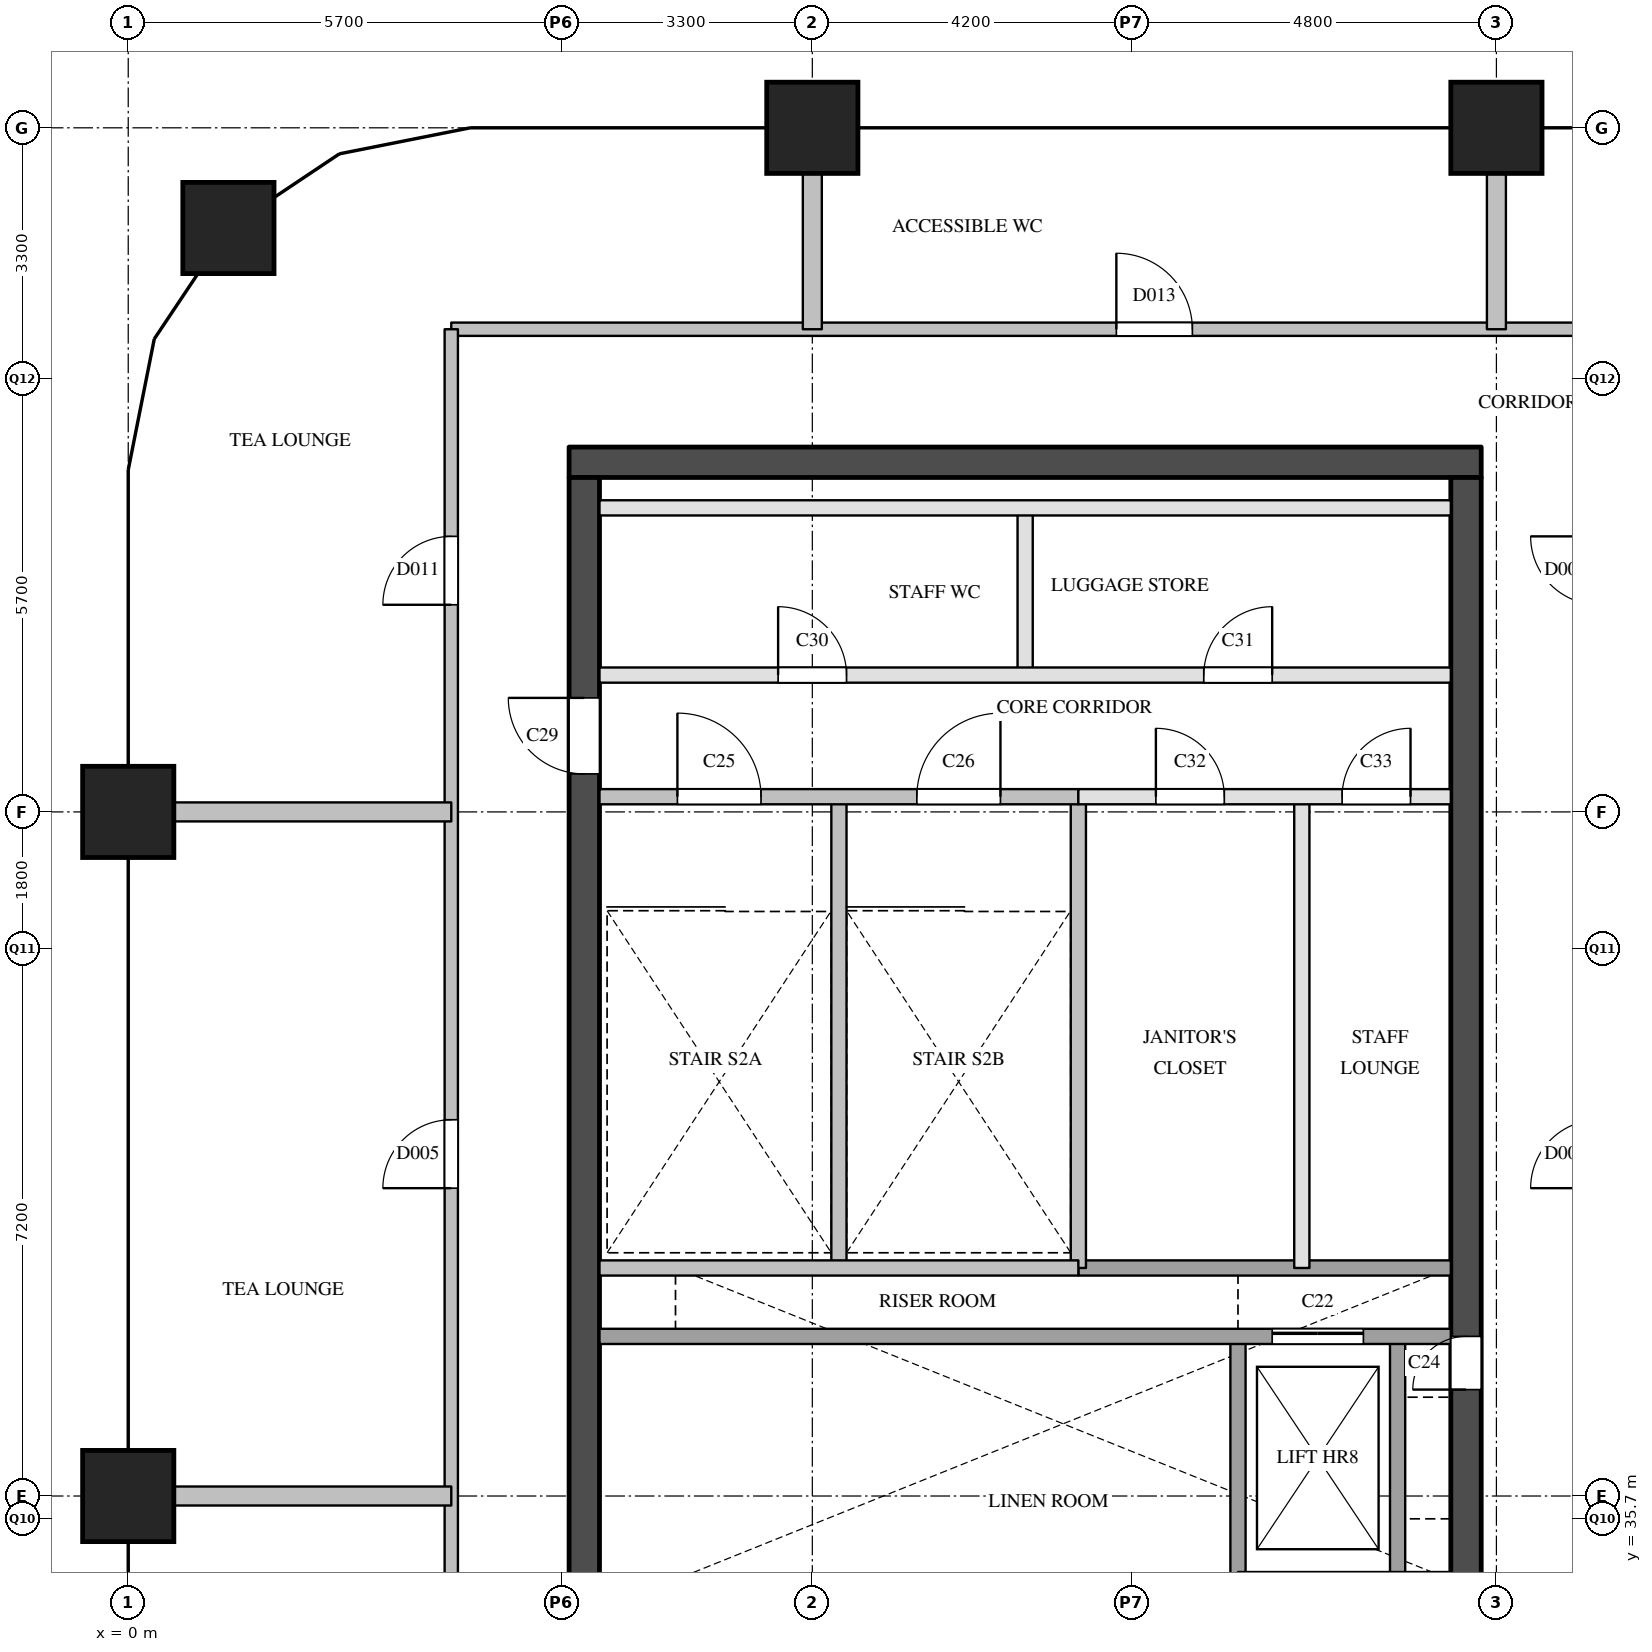
"""IFC4 building model, lengths in metres.
Left out: names, types, materials, properties, quantities, classifications, styles, units other than length and angle.
Written with IfcOpenShell. Run it as: python <this file> out.ifc"""

import sys

from ifc_helpers import new_model, si_unit, direction, frame, frame_2d, origin, origin_2d, place, context, subcontext, project, spatial, rectangle, extrude, element, fill, save


model = new_model("IFC4")
c1 = context("Model", 3, precision=1e-05, world=origin(), true_north=direction((0.0, 1.0)))
c2 = subcontext(c1, "Body", "Model", "MODEL_VIEW")
j1 = project(units=[si_unit("LENGTHUNIT", "METRE"), si_unit("PLANEANGLEUNIT", "RADIAN")], contexts=[c1])
p1 = place(None, origin())
s1 = spatial("IfcSite", under=j1, at=p1, CompositionType="ELEMENT")
p2 = place(p1, origin())
s2 = spatial("IfcBuilding", under=s1, at=p2, CompositionType="ELEMENT")
p3 = place(p2, frame((0.0, 0.0, 230.6)))
s3 = spatial("IfcBuildingStorey", under=s2, at=p3, CompositionType="ELEMENT", Elevation=230.6)
for number, where, z_axis, x_axis in (
    (1, (0.0, 36.0, 0.0), (0.0, 0.0, 1.0), (1.0, 0.0, 0.0)),
    (2, (0.0, 45.0, 0.0), (0.0, 0.0, 1.0), (1.0, 0.0, 0.0)),
    (3, (1.318, 52.682, 0.0), (0.0, 0.0, 1.0), (1.0, 0.0, 0.0)),
    (4, (9.0, 54.0, 0.0), (0.0, 0.0, 1.0), (1.0, 0.0, 0.0)),
    (5, (18.0, 54.0, 0.0), (0.0, 0.0, 1.0), (1.0, 0.0, 0.0)),
):
    element("IfcColumn", number, at=place(p3, frame(where, z_axis=z_axis, x_axis=x_axis)), inside=s3, PredefinedType="COLUMN", context=c2, shape_type="SweptSolid", body=[
        extrude(rectangle(XDim=1.2, YDim=1.2, at=origin_2d()), origin(), (0.0, 0.0, 1.0), 3.9),
    ])
p4 = place(p3, frame((5.8, 49.6, 0.0), z_axis=(0.0, 0.0, 1.0), x_axis=(1.0, 0.0, 0.0)))
e6 = element("IfcWall", 6, at=p4, inside=s3, PredefinedType="SHEAR", context=c2, shape_type="SweptSolid", body=[
    extrude(rectangle(XDim=12.0, YDim=0.4, at=frame_2d((6.0, 0.0))), origin(), (0.0, 0.0, 1.0), 3.6),
])
p5 = place(p3, frame((6.0, 29.1, 0.0), z_axis=(0.0, 0.0, 1.0), x_axis=(0.0, 1.0, 0.0)))
e7 = element("IfcWall", 7, at=p5, inside=s3, PredefinedType="SHEAR", context=c2, shape_type="SweptSolid", body=[
    extrude(rectangle(XDim=20.3, YDim=0.4, at=frame_2d((10.15, 0.0))), origin(), (0.0, 0.0, 1.0), 3.6),
])
p6 = place(p5, frame((3.45, 0.0, 0.0)))
e8 = element("IfcOpeningElement", 8, at=p6, cuts=e7, PredefinedType="OPENING", context=c2, shape_type="SweptSolid", body=[
    extrude(rectangle(XDim=1.0, YDim=2.1, at=frame_2d((0.5, 1.05))), frame((0.0, 0.21, 0.0), z_axis=(0.0, -1.0, 0.0), x_axis=(1.0, 0.0, 0.0)), (0.0, 0.0, 1.0), 0.42),
])
p7 = place(p5, frame((16.4, 0.0, 0.0)))
e9 = element("IfcOpeningElement", 9, at=p7, cuts=e7, PredefinedType="OPENING", context=c2, shape_type="SweptSolid", body=[
    extrude(rectangle(XDim=1.0, YDim=2.1, at=frame_2d((0.5, 1.05))), frame((0.0, 0.21, 0.0), z_axis=(0.0, -1.0, 0.0), x_axis=(1.0, 0.0, 0.0)), (0.0, 0.0, 1.0), 0.42),
])
p8 = place(p3, frame((17.6, 29.1, 0.0), z_axis=(0.0, 0.0, 1.0), x_axis=(0.0, 1.0, 0.0)))
e10 = element("IfcWall", 10, at=p8, inside=s3, PredefinedType="SHEAR", context=c2, shape_type="SweptSolid", body=[
    extrude(rectangle(XDim=20.3, YDim=0.4, at=frame_2d((10.15, 0.0))), origin(), (0.0, 0.0, 1.0), 3.6),
])
p9 = place(p8, frame((1.25, 0.0, 0.0)))
e11 = element("IfcOpeningElement", 11, at=p9, cuts=e10, PredefinedType="OPENING", context=c2, shape_type="SweptSolid", body=[
    extrude(rectangle(XDim=0.7, YDim=2.1, at=frame_2d((0.35, 1.05))), frame((0.0, 0.21, 0.0), z_axis=(0.0, -1.0, 0.0), x_axis=(1.0, 0.0, 0.0)), (0.0, 0.0, 1.0), 0.42),
])
p10 = place(p8, frame((8.3, 0.0, 0.0)))
e12 = element("IfcOpeningElement", 12, at=p10, cuts=e10, PredefinedType="OPENING", context=c2, shape_type="SweptSolid", body=[
    extrude(rectangle(XDim=0.7, YDim=2.1, at=frame_2d((0.35, 1.05))), frame((0.0, 0.21, 0.0), z_axis=(0.0, -1.0, 0.0), x_axis=(1.0, 0.0, 0.0)), (0.0, 0.0, 1.0), 0.42),
])
p11 = place(p8, frame((3.6, 0.0, 0.0)))
e13 = element("IfcOpeningElement", 13, at=p11, cuts=e10, PredefinedType="OPENING", context=c2, shape_type="SweptSolid", body=[
    extrude(rectangle(XDim=1.8, YDim=2.1, at=frame_2d((0.9, 1.05))), frame((0.0, 0.21, 0.0), z_axis=(0.0, -1.0, 0.0), x_axis=(1.0, 0.0, 0.0)), (0.0, 0.0, 1.0), 0.42),
])
p12 = place(p3, frame((9.35, 39.0, 0.0), z_axis=(0.0, 0.0, 1.0), x_axis=(0.0, 1.0, 0.0)))
e14 = element("IfcWall", 14, at=p12, inside=s3, PredefinedType="SOLIDWALL", context=c2, shape_type="SweptSolid", body=[
    extrude(rectangle(XDim=6.2, YDim=0.2, at=frame_2d((3.1, 0.0))), origin(), (0.0, 0.0, 1.0), 3.6),
])
p13 = place(p3, frame((11.8, 46.8, 0.0), z_axis=(0.0, 0.0, 1.0), x_axis=(0.0, 1.0, 0.0)))
e15 = element("IfcWall", 15, at=p13, inside=s3, PredefinedType="PARTITIONING", context=c2, shape_type="SweptSolid", body=[
    extrude(rectangle(XDim=2.2, YDim=0.2, at=frame_2d((1.1, 0.0))), origin(), (0.0, 0.0, 1.0), 3.6),
])
p14 = place(p3, frame((12.5, 39.0, 0.0), z_axis=(0.0, 0.0, 1.0), x_axis=(0.0, 1.0, 0.0)))
e16 = element("IfcWall", 16, at=p14, inside=s3, PredefinedType="SOLIDWALL", context=c2, shape_type="SweptSolid", body=[
    extrude(rectangle(XDim=6.2, YDim=0.2, at=frame_2d((3.1, 0.0))), origin(), (0.0, 0.0, 1.0), 3.6),
])
p15 = place(p3, frame((14.6, 34.9, 0.0), z_axis=(0.0, 0.0, 1.0), x_axis=(0.0, 1.0, 0.0)))
e17 = element("IfcWall", 17, at=p15, inside=s3, PredefinedType="SOLIDWALL", context=c2, shape_type="SweptSolid", body=[
    extrude(rectangle(XDim=3.2, YDim=0.2, at=frame_2d((1.6, 0.0))), origin(), (0.0, 0.0, 1.0), 3.6),
])
p16 = place(p3, frame((15.44, 39.0, 0.0), z_axis=(0.0, 0.0, 1.0), x_axis=(0.0, 1.0, 0.0)))
e18 = element("IfcWall", 18, at=p16, inside=s3, PredefinedType="PARTITIONING", context=c2, shape_type="SweptSolid", body=[
    extrude(rectangle(XDim=6.2, YDim=0.2, at=frame_2d((3.1, 0.0))), origin(), (0.0, 0.0, 1.0), 3.6),
])
p17 = place(p3, frame((16.7, 34.9, 0.0), z_axis=(0.0, 0.0, 1.0), x_axis=(0.0, 1.0, 0.0)))
e19 = element("IfcWall", 19, at=p17, inside=s3, PredefinedType="SOLIDWALL", context=c2, shape_type="SweptSolid", body=[
    extrude(rectangle(XDim=3.2, YDim=0.2, at=frame_2d((1.6, 0.0))), origin(), (0.0, 0.0, 1.0), 3.6),
])
p18 = place(p3, frame((6.2, 38.1, 0.0), z_axis=(0.0, 0.0, 1.0), x_axis=(1.0, 0.0, 0.0)))
e20 = element("IfcWall", 20, at=p18, inside=s3, PredefinedType="SOLIDWALL", context=c2, shape_type="SweptSolid", body=[
    extrude(rectangle(XDim=11.2, YDim=0.2, at=frame_2d((5.6, 0.0))), origin(), (0.0, 0.0, 1.0), 3.6),
])
p19 = place(p18, frame((8.85, 0.0, 0.0)))
e21 = element("IfcOpeningElement", 21, at=p19, cuts=e20, PredefinedType="OPENING", context=c2, shape_type="SweptSolid", body=[
    extrude(rectangle(XDim=1.2, YDim=2.1, at=frame_2d((0.6, 1.05))), frame((0.0, 0.11, 0.0), z_axis=(0.0, -1.0, 0.0), x_axis=(1.0, 0.0, 0.0)), (0.0, 0.0, 1.0), 0.22),
])
p20 = place(p3, frame((12.5, 39.0, 0.0), z_axis=(0.0, 0.0, 1.0), x_axis=(1.0, 0.0, 0.0)))
e22 = element("IfcWall", 22, at=p20, inside=s3, PredefinedType="SOLIDWALL", context=c2, shape_type="SweptSolid", body=[
    extrude(rectangle(XDim=4.9, YDim=0.2, at=frame_2d((2.45, 0.0))), origin(), (0.0, 0.0, 1.0), 3.6),
])
p21 = place(p3, frame((6.2, 39.0, 0.0), z_axis=(0.0, 0.0, 1.0), x_axis=(1.0, 0.0, 0.0)))
e23 = element("IfcWall", 23, at=p21, inside=s3, PredefinedType="SOLIDWALL", context=c2, shape_type="SweptSolid", body=[
    extrude(rectangle(XDim=6.3, YDim=0.2, at=frame_2d((3.15, 0.0))), origin(), (0.0, 0.0, 1.0), 3.6),
])
p22 = place(p3, frame((12.5, 45.2, 0.0), z_axis=(0.0, 0.0, 1.0), x_axis=(1.0, 0.0, 0.0)))
e24 = element("IfcWall", 24, at=p22, inside=s3, PredefinedType="PARTITIONING", context=c2, shape_type="SweptSolid", body=[
    extrude(rectangle(XDim=4.9, YDim=0.2, at=frame_2d((2.45, 0.0))), origin(), (0.0, 0.0, 1.0), 3.6),
])
p23 = place(p22, frame((1.02, 0.0, 0.0)))
e25 = element("IfcOpeningElement", 25, at=p23, cuts=e24, PredefinedType="OPENING", context=c2, shape_type="SweptSolid", body=[
    extrude(rectangle(XDim=0.9, YDim=2.1, at=frame_2d((0.45, 1.05))), frame((0.0, 0.11, 0.0), z_axis=(0.0, -1.0, 0.0), x_axis=(1.0, 0.0, 0.0)), (0.0, 0.0, 1.0), 0.22),
])
p24 = place(p22, frame((3.47, 0.0, 0.0)))
e26 = element("IfcOpeningElement", 26, at=p24, cuts=e24, PredefinedType="OPENING", context=c2, shape_type="SweptSolid", body=[
    extrude(rectangle(XDim=0.9, YDim=2.1, at=frame_2d((0.45, 1.05))), frame((0.0, 0.11, 0.0), z_axis=(0.0, -1.0, 0.0), x_axis=(1.0, 0.0, 0.0)), (0.0, 0.0, 1.0), 0.22),
])
p25 = place(p3, frame((6.2, 45.2, 0.0), z_axis=(0.0, 0.0, 1.0), x_axis=(1.0, 0.0, 0.0)))
e27 = element("IfcWall", 27, at=p25, inside=s3, PredefinedType="SOLIDWALL", context=c2, shape_type="SweptSolid", body=[
    extrude(rectangle(XDim=6.3, YDim=0.2, at=frame_2d((3.15, 0.0))), origin(), (0.0, 0.0, 1.0), 3.6),
])
p26 = place(p25, frame((1.025, 0.0, 0.0)))
e28 = element("IfcOpeningElement", 28, at=p26, cuts=e27, PredefinedType="OPENING", context=c2, shape_type="SweptSolid", body=[
    extrude(rectangle(XDim=1.1, YDim=2.1, at=frame_2d((0.55, 1.05))), frame((0.0, 0.11, 0.0), z_axis=(0.0, -1.0, 0.0), x_axis=(1.0, 0.0, 0.0)), (0.0, 0.0, 1.0), 0.22),
])
p27 = place(p25, frame((4.175, 0.0, 0.0)))
e29 = element("IfcOpeningElement", 29, at=p27, cuts=e27, PredefinedType="OPENING", context=c2, shape_type="SweptSolid", body=[
    extrude(rectangle(XDim=1.1, YDim=2.1, at=frame_2d((0.55, 1.05))), frame((0.0, 0.11, 0.0), z_axis=(0.0, -1.0, 0.0), x_axis=(1.0, 0.0, 0.0)), (0.0, 0.0, 1.0), 0.22),
])
p28 = place(p3, frame((6.2, 46.8, 0.0), z_axis=(0.0, 0.0, 1.0), x_axis=(1.0, 0.0, 0.0)))
e30 = element("IfcWall", 30, at=p28, inside=s3, PredefinedType="PARTITIONING", context=c2, shape_type="SweptSolid", body=[
    extrude(rectangle(XDim=11.2, YDim=0.2, at=frame_2d((5.6, 0.0))), origin(), (0.0, 0.0, 1.0), 3.6),
])
p29 = place(p28, frame((2.35, 0.0, 0.0)))
e31 = element("IfcOpeningElement", 31, at=p29, cuts=e30, PredefinedType="OPENING", context=c2, shape_type="SweptSolid", body=[
    extrude(rectangle(XDim=0.9, YDim=2.1, at=frame_2d((0.45, 1.05))), frame((0.0, 0.11, 0.0), z_axis=(0.0, -1.0, 0.0), x_axis=(1.0, 0.0, 0.0)), (0.0, 0.0, 1.0), 0.22),
])
p30 = place(p28, frame((7.95, 0.0, 0.0)))
e32 = element("IfcOpeningElement", 32, at=p30, cuts=e30, PredefinedType="OPENING", context=c2, shape_type="SweptSolid", body=[
    extrude(rectangle(XDim=0.9, YDim=2.1, at=frame_2d((0.45, 1.05))), frame((0.0, 0.11, 0.0), z_axis=(0.0, -1.0, 0.0), x_axis=(1.0, 0.0, 0.0)), (0.0, 0.0, 1.0), 0.22),
])
p31 = place(p3, frame((6.2, 49.0, 0.0), z_axis=(0.0, 0.0, 1.0), x_axis=(1.0, 0.0, 0.0)))
e33 = element("IfcWall", 33, at=p31, inside=s3, PredefinedType="PARTITIONING", context=c2, shape_type="SweptSolid", body=[
    extrude(rectangle(XDim=11.2, YDim=0.2, at=frame_2d((5.6, 0.0))), origin(), (0.0, 0.0, 1.0), 3.6),
])
p32 = place(p3, frame((4.25, 51.35, 0.0), z_axis=(0.0, 0.0, 1.0), x_axis=(1.0, 0.0, 0.0)))
e34 = element("IfcWall", 34, at=p32, inside=s3, PredefinedType="PARTITIONING", context=c2, shape_type="SweptSolid", body=[
    extrude(rectangle(XDim=15.1, YDim=0.175, at=frame_2d((7.55, 0.0))), origin(), (0.0, 0.0, 1.0), 3.6),
])
p33 = place(p32, frame((8.75, 0.0, 0.0)))
e35 = element("IfcOpeningElement", 35, at=p33, cuts=e34, PredefinedType="OPENING", context=c2, shape_type="SweptSolid", body=[
    extrude(rectangle(XDim=1.0, YDim=2.1, at=frame_2d((0.5, 1.05))), frame((0.0, 0.097, 0.0), z_axis=(0.0, -1.0, 0.0), x_axis=(1.0, 0.0, 0.0)), (0.0, 0.0, 1.0), 0.195),
])
p34 = place(p3, frame((4.25, 28.5, 0.0), z_axis=(0.0, 0.0, 1.0), x_axis=(0.0, 1.0, 0.0)))
e36 = element("IfcWall", 36, at=p34, inside=s3, PredefinedType="PARTITIONING", context=c2, shape_type="SweptSolid", body=[
    extrude(rectangle(XDim=22.85, YDim=0.175, at=frame_2d((11.425, 0.0))), origin(), (0.0, 0.0, 1.0), 3.6),
])
p35 = place(p34, frame((3.3, 0.0, 0.0)))
e37 = element("IfcOpeningElement", 37, at=p35, cuts=e36, PredefinedType="OPENING", context=c2, shape_type="SweptSolid", body=[
    extrude(rectangle(XDim=0.9, YDim=2.1, at=frame_2d((0.45, 1.05))), frame((0.0, 0.097, 0.0), z_axis=(0.0, -1.0, 0.0), x_axis=(1.0, 0.0, 0.0)), (0.0, 0.0, 1.0), 0.195),
])
p36 = place(p34, frame((11.55, 0.0, 0.0)))
e38 = element("IfcOpeningElement", 38, at=p36, cuts=e36, PredefinedType="OPENING", context=c2, shape_type="SweptSolid", body=[
    extrude(rectangle(XDim=0.9, YDim=2.1, at=frame_2d((0.45, 1.05))), frame((0.0, 0.097, 0.0), z_axis=(0.0, -1.0, 0.0), x_axis=(1.0, 0.0, 0.0)), (0.0, 0.0, 1.0), 0.195),
])
p37 = place(p34, frame((19.225, 0.0, 0.0)))
e39 = element("IfcOpeningElement", 39, at=p37, cuts=e36, PredefinedType="OPENING", context=c2, shape_type="SweptSolid", body=[
    extrude(rectangle(XDim=0.9, YDim=2.1, at=frame_2d((0.45, 1.05))), frame((0.0, 0.097, 0.0), z_axis=(0.0, -1.0, 0.0), x_axis=(1.0, 0.0, 0.0)), (0.0, 0.0, 1.0), 0.195),
])
for number, where, z_axis, x_axis in (
    (40, (0.0, 36.0, 0.0), (0.0, 0.0, 1.0), (1.0, 0.0, 0.0)),
    (41, (0.0, 45.0, 0.0), (0.0, 0.0, 1.0), (1.0, 0.0, 0.0)),
):
    element("IfcWall", number, at=place(p3, frame(where, z_axis=z_axis, x_axis=x_axis)), inside=s3, PredefinedType="PARTITIONING", context=c2, shape_type="SweptSolid", body=[
        extrude(rectangle(XDim=4.25, YDim=0.25, at=frame_2d((2.125, 0.0))), origin(), (0.0, 0.0, 1.0), 3.6),
    ])
for number, where, z_axis, x_axis in (
    (42, (9.0, 51.35, 0.0), (0.0, 0.0, 1.0), (0.0, 1.0, 0.0)),
    (43, (18.0, 51.35, 0.0), (0.0, 0.0, 1.0), (0.0, 1.0, 0.0)),
):
    element("IfcWall", number, at=place(p3, frame(where, z_axis=z_axis, x_axis=x_axis)), inside=s3, PredefinedType="PARTITIONING", context=c2, shape_type="SweptSolid", body=[
        extrude(rectangle(XDim=2.65, YDim=0.25, at=frame_2d((1.325, 0.0))), origin(), (0.0, 0.0, 1.0), 3.6),
    ])
p38 = place(p19, origin())
e44 = element("IfcDoor", 44, at=p38, inside=s3, OperationType="SLIDING_TO_LEFT", PredefinedType="DOOR", context=c2, shape_type="SweptSolid", body=[
    extrude(rectangle(XDim=1.2, YDim=2.1, at=frame_2d((0.6, 1.05))), frame((0.0, 0.025, 0.0), z_axis=(0.0, -1.0, 0.0), x_axis=(1.0, 0.0, 0.0)), (0.0, 0.0, 1.0), 0.05),
])
fill(e21, e44)
p39 = place(p10, origin())
e45 = element("IfcDoor", 45, at=p39, inside=s3, OperationType="SINGLE_SWING_LEFT", PredefinedType="DOOR", context=c2, shape_type="SweptSolid", body=[
    extrude(rectangle(XDim=0.7, YDim=2.1, at=frame_2d((0.35, 1.05))), frame((0.0, 0.025, 0.0), z_axis=(0.0, -1.0, 0.0), x_axis=(1.0, 0.0, 0.0)), (0.0, 0.0, 1.0), 0.05),
])
fill(e12, e45)
p40 = place(p26, origin())
e46 = element("IfcDoor", 46, at=p40, inside=s3, OperationType="SINGLE_SWING_LEFT", PredefinedType="DOOR", context=c2, shape_type="SweptSolid", body=[
    extrude(rectangle(XDim=1.1, YDim=2.1, at=frame_2d((0.55, 1.05))), frame((0.0, 0.025, 0.0), z_axis=(0.0, -1.0, 0.0), x_axis=(1.0, 0.0, 0.0)), (0.0, 0.0, 1.0), 0.05),
])
fill(e28, e46)
p41 = place(p27, origin())
e47 = element("IfcDoor", 47, at=p41, inside=s3, OperationType="SINGLE_SWING_RIGHT", PredefinedType="DOOR", context=c2, shape_type="SweptSolid", body=[
    extrude(rectangle(XDim=1.1, YDim=2.1, at=frame_2d((0.55, 1.05))), frame((0.0, 0.025, 0.0), z_axis=(0.0, -1.0, 0.0), x_axis=(1.0, 0.0, 0.0)), (0.0, 0.0, 1.0), 0.05),
])
fill(e29, e47)
p42 = place(p7, origin())
e48 = element("IfcDoor", 48, at=p42, inside=s3, OperationType="SINGLE_SWING_RIGHT", PredefinedType="DOOR", context=c2, shape_type="SweptSolid", body=[
    extrude(rectangle(XDim=1.0, YDim=2.1, at=frame_2d((0.5, 1.05))), frame((0.0, 0.025, 0.0), z_axis=(0.0, -1.0, 0.0), x_axis=(1.0, 0.0, 0.0)), (0.0, 0.0, 1.0), 0.05),
])
fill(e9, e48)
p43 = place(p29, origin())
e49 = element("IfcDoor", 49, at=p43, inside=s3, OperationType="SINGLE_SWING_LEFT", PredefinedType="DOOR", context=c2, shape_type="SweptSolid", body=[
    extrude(rectangle(XDim=0.9, YDim=2.1, at=frame_2d((0.45, 1.05))), frame((0.0, 0.025, 0.0), z_axis=(0.0, -1.0, 0.0), x_axis=(1.0, 0.0, 0.0)), (0.0, 0.0, 1.0), 0.05),
])
fill(e31, e49)
p44 = place(p30, origin())
e50 = element("IfcDoor", 50, at=p44, inside=s3, OperationType="SINGLE_SWING_RIGHT", PredefinedType="DOOR", context=c2, shape_type="SweptSolid", body=[
    extrude(rectangle(XDim=0.9, YDim=2.1, at=frame_2d((0.45, 1.05))), frame((0.0, 0.025, 0.0), z_axis=(0.0, -1.0, 0.0), x_axis=(1.0, 0.0, 0.0)), (0.0, 0.0, 1.0), 0.05),
])
fill(e32, e50)
p45 = place(p23, origin())
e51 = element("IfcDoor", 51, at=p45, inside=s3, OperationType="SINGLE_SWING_LEFT", PredefinedType="DOOR", context=c2, shape_type="SweptSolid", body=[
    extrude(rectangle(XDim=0.9, YDim=2.1, at=frame_2d((0.45, 1.05))), frame((0.0, 0.025, 0.0), z_axis=(0.0, -1.0, 0.0), x_axis=(1.0, 0.0, 0.0)), (0.0, 0.0, 1.0), 0.05),
])
fill(e25, e51)
p46 = place(p24, origin())
e52 = element("IfcDoor", 52, at=p46, inside=s3, OperationType="SINGLE_SWING_RIGHT", PredefinedType="DOOR", context=c2, shape_type="SweptSolid", body=[
    extrude(rectangle(XDim=0.9, YDim=2.1, at=frame_2d((0.45, 1.05))), frame((0.0, 0.025, 0.0), z_axis=(0.0, -1.0, 0.0), x_axis=(1.0, 0.0, 0.0)), (0.0, 0.0, 1.0), 0.05),
])
fill(e26, e52)
p47 = place(p36, origin())
e53 = element("IfcDoor", 53, at=p47, inside=s3, OperationType="SINGLE_SWING_LEFT", PredefinedType="DOOR", context=c2, shape_type="SweptSolid", body=[
    extrude(rectangle(XDim=0.9, YDim=2.1, at=frame_2d((0.45, 1.05))), frame((0.0, 0.025, 0.0), z_axis=(0.0, -1.0, 0.0), x_axis=(1.0, 0.0, 0.0)), (0.0, 0.0, 1.0), 0.05),
])
fill(e38, e53)
p48 = place(p37, origin())
e54 = element("IfcDoor", 54, at=p48, inside=s3, OperationType="SINGLE_SWING_LEFT", PredefinedType="DOOR", context=c2, shape_type="SweptSolid", body=[
    extrude(rectangle(XDim=0.9, YDim=2.1, at=frame_2d((0.45, 1.05))), frame((0.0, 0.025, 0.0), z_axis=(0.0, -1.0, 0.0), x_axis=(1.0, 0.0, 0.0)), (0.0, 0.0, 1.0), 0.05),
])
fill(e39, e54)
p49 = place(p33, origin())
e55 = element("IfcDoor", 55, at=p49, inside=s3, OperationType="SINGLE_SWING_LEFT", PredefinedType="DOOR", context=c2, shape_type="SweptSolid", body=[
    extrude(rectangle(XDim=1.0, YDim=2.1, at=frame_2d((0.5, 1.05))), frame((0.0, 0.025, 0.0), z_axis=(0.0, -1.0, 0.0), x_axis=(1.0, 0.0, 0.0)), (0.0, 0.0, 1.0), 0.05),
])
fill(e35, e55)
save(model, sys.argv[1])
